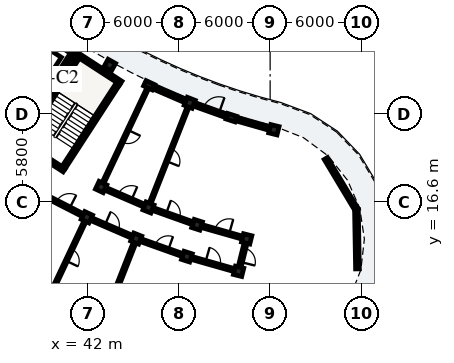
"""IFC4 building model, lengths in metres.
Left out: names, types, materials, properties, quantities, classifications, styles, units other than length and angle.
Written with IfcOpenShell. Run it as: python <this file> out.ifc"""

import sys

from ifc_helpers import new_model, si_unit, direction, frame, frame_2d, origin, origin_2d, place, context, subcontext, project, spatial, rectangle, extrude, element, fill, save


model = new_model("IFC4")
c1 = context("Model", 3, precision=1e-05, world=origin(), true_north=direction((0.0, 1.0)))
c2 = subcontext(c1, "Body", "Model", "MODEL_VIEW")
j1 = project(units=[si_unit("LENGTHUNIT", "METRE"), si_unit("PLANEANGLEUNIT", "RADIAN")], contexts=[c1])
p1 = place(None, origin())
s1 = spatial("IfcSite", under=j1, at=p1, CompositionType="ELEMENT")
p2 = place(p1, origin())
s2 = spatial("IfcBuilding", under=s1, at=p2, CompositionType="ELEMENT")
p3 = place(p2, frame((0.0, 0.0, 12.2)))
s3 = spatial("IfcBuildingStorey", under=s2, at=p3, CompositionType="ELEMENT", Elevation=12.2)
p4 = place(p3, frame((40.413, 18.882, 0.0), z_axis=(0.0, 0.0, 1.0), x_axis=(0.544629435258, 0.838676802022, 0.0)))
e1 = element("IfcWall", 1, at=p4, inside=s3, PredefinedType="SHEAR", context=c2, shape_type="SweptSolid", body=[
    extrude(rectangle(XDim=6.6, YDim=0.25, at=frame_2d((3.3, 0.0))), origin(), (0.0, 0.0, 1.0), 3.11),
])
p5 = place(p3, frame((44.18, 24.454, 0.0), z_axis=(0.0, 0.0, 1.0), x_axis=(-0.838699580527, 0.544594356953, 0.0)))
e2 = element("IfcWall", 2, at=p5, inside=s3, PredefinedType="SHEAR", context=c2, shape_type="SweptSolid", body=[
    extrude(rectangle(XDim=3.42, YDim=0.25, at=frame_2d((1.71, 0.0))), origin(), (0.0, 0.0, 1.0), 3.11),
])
p6 = place(p3, frame((40.449, 18.709, 0.0), z_axis=(0.0, 0.0, 1.0), x_axis=(-0.838678407117, 0.544626963559, 0.0)))
e3 = element("IfcWall", 3, at=p6, inside=s3, PredefinedType="SHEAR", context=c2, shape_type="SweptSolid", body=[
    extrude(rectangle(XDim=3.42, YDim=0.25, at=frame_2d((1.71, 0.0))), origin(), (0.0, 0.0, 1.0), 3.11),
])
p7 = place(p3, frame((37.754, 20.608, 0.0), z_axis=(0.0, 0.0, 1.0), x_axis=(0.544655453679, 0.838659905312, 0.0)))
e4 = element("IfcWall", 4, at=p7, inside=s3, PredefinedType="SHEAR", context=c2, shape_type="SweptSolid", body=[
    extrude(rectangle(XDim=6.6, YDim=0.25, at=frame_2d((3.3, 0.0))), origin(), (0.0, 0.0, 1.0), 3.11),
])
p8 = place(p7, frame((0.22, 0.0, 0.0)))
e5 = element("IfcOpeningElement", 5, at=p8, cuts=e4, PredefinedType="OPENING", context=c2, shape_type="SweptSolid", body=[
    extrude(rectangle(XDim=1.05, YDim=2.15, at=frame_2d((0.525, 1.075))), frame((0.0, 0.135, 0.0), z_axis=(0.0, -1.0, 0.0), x_axis=(1.0, 0.0, 0.0)), (0.0, 0.0, 1.0), 0.27),
])
p9 = place(p3, frame((41.112, 26.375, 0.0), z_axis=(0.0, 0.0, 1.0), x_axis=(-0.838638623546, 0.544688221919, 0.0)))
e6 = element("IfcWall", 6, at=p9, inside=s3, PredefinedType="SHEAR", context=c2, shape_type="SweptSolid", body=[
    extrude(rectangle(XDim=3.26, YDim=0.23, at=frame_2d((1.63, 0.0))), origin(), (0.0, 0.0, 1.0), 3.11),
])
p10 = place(p3, frame((39.482, 24.077, 0.0), z_axis=(0.0, 0.0, 1.0), x_axis=(0.544686387605, 0.838639814913, 0.0)))
e7 = element("IfcWall", 7, at=p10, inside=s3, PredefinedType="SHEAR", context=c2, shape_type="SweptSolid", body=[
    extrude(rectangle(XDim=2.7, YDim=0.23, at=frame_2d((1.35, 0.0))), origin(), (0.0, 0.0, 1.0), 3.11),
])
p11 = place(p3, frame((43.45, 25.623, 0.0), z_axis=(0.0, 0.0, 1.0), x_axis=(-0.484809620246, -0.874619707139, 0.0)))
e8 = element("IfcColumn", 8, at=p11, inside=s3, PredefinedType="COLUMN", context=c2, shape_type="SweptSolid", body=[
    extrude(rectangle(XDim=0.56, YDim=0.56, at=origin_2d()), origin(), (0.0, 0.0, 1.0), 3.105),
])
p12 = place(p3, frame((46.039, 24.297, 0.0), z_axis=(0.0, 0.0, 1.0), x_axis=(-0.426568739901, -0.904455145454, 0.0)))
e9 = element("IfcColumn", 9, at=p12, inside=s3, PredefinedType="PILASTER", context=c2, shape_type="SweptSolid", body=[
    extrude(rectangle(XDim=0.38, YDim=0.62, at=origin_2d()), origin(), (0.0, 0.0, 1.0), 3.105),
])
for number, where, z_axis, x_axis in (
    (10, (42.882, 17.604, 0.0), (0.0, 0.0, 1.0), (-0.427, -0.904, 0.0)),
    (11, (41.944, 15.614, 0.0), (0.0, 0.0, 1.0), (-0.427, -0.904, 0.0)),
    (12, (48.709, 23.143, 0.0), (0.0, 0.0, 1.0), (-0.367, -0.93, 0.0)),
    (13, (45.997, 16.258, 0.0), (0.0, 0.0, 1.0), (-0.367, -0.93, 0.0)),
    (14, (45.191, 14.211, 0.0), (0.0, 0.0, 1.0), (-0.367, -0.93, 0.0)),
):
    element("IfcColumn", number, at=place(p3, frame(where, z_axis=z_axis, x_axis=x_axis)), inside=s3, PredefinedType="COLUMN", context=c2, shape_type="SweptSolid", body=[
        extrude(rectangle(XDim=0.56, YDim=0.56, at=origin_2d()), origin(), (0.0, 0.0, 1.0), 3.105),
    ])
p13 = place(p3, frame((51.449, 22.166, 0.0), z_axis=(0.0, 0.0, 1.0), x_axis=(-0.304864299028, -0.952395799643, 0.0)))
e15 = element("IfcColumn", 15, at=p13, inside=s3, PredefinedType="PILASTER", context=c2, shape_type="SweptSolid", body=[
    extrude(rectangle(XDim=0.38, YDim=0.62, at=origin_2d()), origin(), (0.0, 0.0, 1.0), 3.105),
])
for number, where, z_axis, x_axis in (
    (16, (49.193, 15.118, 0.0), (0.0, 0.0, 1.0), (-0.305, -0.952, 0.0)),
    (17, (48.522, 13.023, 0.0), (0.0, 0.0, 1.0), (-0.305, -0.952, 0.0)),
    (18, (54.247, 21.37, 0.0), (0.0, 0.0, 1.0), (-0.242, -0.97, 0.0)),
    (19, (52.456, 14.19, 0.0), (0.0, 0.0, 1.0), (-0.242, -0.97, 0.0)),
    (20, (51.924, 12.055, 0.0), (0.0, 0.0, 1.0), (-0.242, -0.97, 0.0)),
):
    element("IfcColumn", number, at=place(p3, frame(where, z_axis=z_axis, x_axis=x_axis)), inside=s3, PredefinedType="COLUMN", context=c2, shape_type="SweptSolid", body=[
        extrude(rectangle(XDim=0.56, YDim=0.56, at=origin_2d()), origin(), (0.0, 0.0, 1.0), 3.105),
    ])
p14 = place(p3, frame((46.186, 24.233, 0.0), z_axis=(0.0, 0.0, 1.0), x_axis=(0.91795321239, -0.396688668686, 0.0)))
e21 = element("IfcWall", 21, at=p14, inside=s3, PredefinedType="SOLIDWALL", context=c2, shape_type="SweptSolid", body=[
    extrude(rectangle(XDim=2.499, YDim=0.245, at=frame_2d((1.25, 0.0))), origin(), (0.0, 0.0, 1.0), 2.355),
])
p15 = place(p14, frame((0.609, 0.0, 0.55)))
e22 = element("IfcOpeningElement", 22, at=p15, cuts=e21, PredefinedType="OPENING", context=c2, shape_type="SweptSolid", body=[
    extrude(rectangle(XDim=1.28, YDim=1.56, at=frame_2d((0.64, 0.78))), frame((0.0, 0.133, 0.0), z_axis=(0.0, -1.0, 0.0), x_axis=(1.0, 0.0, 0.0)), (0.0, 0.0, 1.0), 0.265),
])
p16 = place(p3, frame((48.945, 23.059, 0.0), z_axis=(0.0, 0.0, 1.0), x_axis=(0.941892135469, -0.33591547321, 0.0)))
e23 = element("IfcWall", 23, at=p16, inside=s3, PredefinedType="SOLIDWALL", context=c2, shape_type="SweptSolid", body=[
    extrude(rectangle(XDim=2.499, YDim=0.245, at=frame_2d((1.25, 0.0))), origin(), (0.0, 0.0, 1.0), 2.355),
])
p17 = place(p16, frame((0.709, 0.0, 0.0)))
e24 = element("IfcOpeningElement", 24, at=p17, cuts=e23, PredefinedType="OPENING", context=c2, shape_type="SweptSolid", body=[
    extrude(rectangle(XDim=1.08, YDim=2.15, at=frame_2d((0.54, 1.075))), frame((0.0, 0.133, 0.0), z_axis=(0.0, -1.0, 0.0), x_axis=(1.0, 0.0, 0.0)), (0.0, 0.0, 1.0), 0.265),
])
p18 = place(p3, frame((51.603, 22.122, 0.0), z_axis=(0.0, 0.0, 1.0), x_axis=(0.961847744742, -0.273585299195, 0.0)))
e25 = element("IfcWall", 25, at=p18, inside=s3, PredefinedType="SOLIDWALL", context=c2, shape_type="SweptSolid", body=[
    extrude(rectangle(XDim=2.499, YDim=0.245, at=frame_2d((1.249, 0.0))), origin(), (0.0, 0.0, 1.0), 2.355),
])
p19 = place(p18, frame((0.49, 0.0, 0.55)))
e26 = element("IfcOpeningElement", 26, at=p19, cuts=e25, PredefinedType="OPENING", context=c2, shape_type="SweptSolid", body=[
    extrude(rectangle(XDim=1.52, YDim=1.485, at=frame_2d((0.76, 0.743))), frame((0.0, 0.133, 0.0), z_axis=(0.0, -1.0, 0.0), x_axis=(1.0, 0.0, 0.0)), (0.0, 0.0, 1.0), 0.265),
])
p20 = place(p3, frame((57.665, 19.476, 0.0), z_axis=(0.0, 0.0, 1.0), x_axis=(0.515019321998, -0.857178568309, 0.0)))
e27 = element("IfcWall", 27, at=p20, inside=s3, PredefinedType="SOLIDWALL", context=c2, shape_type="SweptSolid", body=[
    extrude(rectangle(XDim=3.908, YDim=0.245, at=frame_2d((1.954, 0.0))), origin(), (0.0, 0.0, 1.0), 2.355),
])
p21 = place(p20, frame((1.029, 0.0, 0.4)))
e28 = element("IfcOpeningElement", 28, at=p21, cuts=e27, PredefinedType="OPENING", context=c2, shape_type="SweptSolid", body=[
    extrude(rectangle(XDim=1.85, YDim=1.72, at=frame_2d((0.925, 0.86))), frame((0.0, 0.133, 0.0), z_axis=(0.0, -1.0, 0.0), x_axis=(1.0, 0.0, 0.0)), (0.0, 0.0, 1.0), 0.265),
])
p22 = place(p3, frame((59.677, 16.126, 0.0), z_axis=(0.0, 0.0, 1.0), x_axis=(0.017490763899, -0.999847024888, 0.0)))
e29 = element("IfcWall", 29, at=p22, inside=s3, PredefinedType="SOLIDWALL", context=c2, shape_type="SweptSolid", body=[
    extrude(rectangle(XDim=3.908, YDim=0.245, at=frame_2d((1.954, 0.0))), origin(), (0.0, 0.0, 1.0), 2.355),
])
p23 = place(p22, frame((0.979, 0.0, 0.4)))
e30 = element("IfcOpeningElement", 30, at=p23, cuts=e29, PredefinedType="OPENING", context=c2, shape_type="SweptSolid", body=[
    extrude(rectangle(XDim=1.95, YDim=1.78, at=frame_2d((0.975, 0.89))), frame((0.0, 0.133, 0.0), z_axis=(0.0, -1.0, 0.0), x_axis=(1.0, 0.0, 0.0)), (0.0, 0.0, 1.0), 0.265),
])
p24 = place(p3, frame((39.107, 17.067, 0.0), z_axis=(0.0, 0.0, 1.0), x_axis=(0.890030590607, -0.45590080915, 0.0)))
e31 = element("IfcWall", 31, at=p24, inside=s3, PredefinedType="PARTITIONING", context=c2, shape_type="SweptSolid", body=[
    extrude(rectangle(XDim=2.837, YDim=0.195, at=frame_2d((1.418, 0.0))), origin(), (0.0, 0.0, 1.0), 2.37),
])
p25 = place(p24, frame((0.934, 0.0, 0.0)))
e32 = element("IfcOpeningElement", 32, at=p25, cuts=e31, PredefinedType="OPENING", context=c2, shape_type="SweptSolid", body=[
    extrude(rectangle(XDim=0.97, YDim=2.15, at=frame_2d((0.485, 1.075))), frame((0.0, 0.107, 0.0), z_axis=(0.0, -1.0, 0.0), x_axis=(1.0, 0.0, 0.0)), (0.0, 0.0, 1.0), 0.215),
])
p26 = place(p3, frame((41.773, 15.252, 0.0), z_axis=(0.0, 0.0, 1.0), x_axis=(-0.426567365945, -0.904455793453, 0.0)))
e33 = element("IfcWall", 33, at=p26, inside=s3, PredefinedType="PLUMBINGWALL", context=c2, shape_type="SweptSolid", body=[
    extrude(rectangle(XDim=4.7, YDim=0.14, at=frame_2d((2.35, 0.0))), origin(), (0.0, 0.0, 1.0), 2.37),
])
p27 = place(p26, frame((1.925, 0.0, 0.0)))
e34 = element("IfcOpeningElement", 34, at=p27, cuts=e33, PredefinedType="OPENING", context=c2, shape_type="SweptSolid", body=[
    extrude(rectangle(XDim=0.85, YDim=2.05, at=frame_2d((0.425, 1.025))), frame((0.0, 0.08, 0.0), z_axis=(0.0, -1.0, 0.0), x_axis=(1.0, 0.0, 0.0)), (0.0, 0.0, 1.0), 0.16),
])
p28 = place(p3, frame((45.868, 23.935, 0.0), z_axis=(0.0, 0.0, 1.0), x_axis=(-0.426573573579, -0.904452865728, 0.0)))
e35 = element("IfcWall", 35, at=p28, inside=s3, PredefinedType="PARTITIONING", context=c2, shape_type="SweptSolid", body=[
    extrude(rectangle(XDim=6.6, YDim=0.125, at=frame_2d((3.3, 0.0))), origin(), (0.0, 0.0, 1.0), 2.37),
])
p29 = place(p28, frame((2.855, 0.0, 0.0)))
e36 = element("IfcOpeningElement", 36, at=p29, cuts=e35, PredefinedType="OPENING", context=c2, shape_type="SweptSolid", body=[
    extrude(rectangle(XDim=0.89, YDim=2.1, at=frame_2d((0.445, 1.05))), frame((0.0, 0.073, 0.0), z_axis=(0.0, -1.0, 0.0), x_axis=(1.0, 0.0, 0.0)), (0.0, 0.0, 1.0), 0.145),
])
p30 = place(p3, frame((42.265, 15.475, 0.0), z_axis=(0.0, 0.0, 1.0), x_axis=(0.917943439406, -0.396711282991, 0.0)))
e37 = element("IfcWall", 37, at=p30, inside=s3, PredefinedType="PARTITIONING", context=c2, shape_type="SweptSolid", body=[
    extrude(rectangle(XDim=2.837, YDim=0.195, at=frame_2d((1.418, 0.0))), origin(), (0.0, 0.0, 1.0), 2.37),
])
p31 = place(p30, frame((0.944, 0.0, 0.0)))
e38 = element("IfcOpeningElement", 38, at=p31, cuts=e37, PredefinedType="OPENING", context=c2, shape_type="SweptSolid", body=[
    extrude(rectangle(XDim=0.95, YDim=2.13, at=frame_2d((0.475, 1.065))), frame((0.0, 0.107, 0.0), z_axis=(0.0, -1.0, 0.0), x_axis=(1.0, 0.0, 0.0)), (0.0, 0.0, 1.0), 0.215),
])
p32 = place(p3, frame((43.204, 17.465, 0.0), z_axis=(0.0, 0.0, 1.0), x_axis=(0.91793557165, -0.39672948756, 0.0)))
e39 = element("IfcWall", 39, at=p32, inside=s3, PredefinedType="PARTITIONING", context=c2, shape_type="SweptSolid", body=[
    extrude(rectangle(XDim=2.693, YDim=0.195, at=frame_2d((1.346, 0.0))), origin(), (0.0, 0.0, 1.0), 2.37),
])
p33 = place(p32, frame((0.872, 0.0, 0.0)))
e40 = element("IfcOpeningElement", 40, at=p33, cuts=e39, PredefinedType="OPENING", context=c2, shape_type="SweptSolid", body=[
    extrude(rectangle(XDim=0.95, YDim=2.13, at=frame_2d((0.475, 1.065))), frame((0.0, 0.107, 0.0), z_axis=(0.0, -1.0, 0.0), x_axis=(1.0, 0.0, 0.0)), (0.0, 0.0, 1.0), 0.215),
])
p34 = place(p3, frame((45.044, 13.839, 0.0), z_axis=(0.0, 0.0, 1.0), x_axis=(-0.366468650514, -0.930430399434, 0.0)))
e41 = element("IfcWall", 41, at=p34, inside=s3, PredefinedType="PARTITIONING", context=c2, shape_type="SweptSolid", body=[
    extrude(rectangle(XDim=4.7, YDim=0.175, at=frame_2d((2.35, 0.0))), origin(), (0.0, 0.0, 1.0), 2.37),
])
p35 = place(p3, frame((48.562, 22.771, 0.0), z_axis=(0.0, 0.0, 1.0), x_axis=(-0.366512873936, -0.930412979939, 0.0)))
e42 = element("IfcWall", 42, at=p35, inside=s3, PredefinedType="PARTITIONING", context=c2, shape_type="SweptSolid", body=[
    extrude(rectangle(XDim=6.6, YDim=0.125, at=frame_2d((3.3, 0.0))), origin(), (0.0, 0.0, 1.0), 2.37),
])
p36 = place(p35, frame((2.865, 0.0, 0.0)))
e43 = element("IfcOpeningElement", 43, at=p36, cuts=e42, PredefinedType="OPENING", context=c2, shape_type="SweptSolid", body=[
    extrude(rectangle(XDim=0.87, YDim=2.08, at=frame_2d((0.435, 1.04))), frame((0.0, 0.073, 0.0), z_axis=(0.0, -1.0, 0.0), x_axis=(1.0, 0.0, 0.0)), (0.0, 0.0, 1.0), 0.145),
])
p37 = place(p3, frame((45.52, 14.093, 0.0), z_axis=(0.0, 0.0, 1.0), x_axis=(0.941930628611, -0.335807520589, 0.0)))
e44 = element("IfcWall", 44, at=p37, inside=s3, PredefinedType="PARTITIONING", context=c2, shape_type="SweptSolid", body=[
    extrude(rectangle(XDim=2.837, YDim=0.195, at=frame_2d((1.418, 0.0))), origin(), (0.0, 0.0, 1.0), 2.37),
])
p38 = place(p37, frame((0.954, 0.0, 0.0)))
e45 = element("IfcOpeningElement", 45, at=p38, cuts=e44, PredefinedType="OPENING", context=c2, shape_type="SweptSolid", body=[
    extrude(rectangle(XDim=0.93, YDim=2.12, at=frame_2d((0.465, 1.06))), frame((0.0, 0.107, 0.0), z_axis=(0.0, -1.0, 0.0), x_axis=(1.0, 0.0, 0.0)), (0.0, 0.0, 1.0), 0.215),
])
p39 = place(p3, frame((46.327, 16.14, 0.0), z_axis=(0.0, 0.0, 1.0), x_axis=(0.941895652647, -0.335905611036, 0.0)))
e46 = element("IfcWall", 46, at=p39, inside=s3, PredefinedType="PARTITIONING", context=c2, shape_type="SweptSolid", body=[
    extrude(rectangle(XDim=2.693, YDim=0.195, at=frame_2d((1.346, 0.0))), origin(), (0.0, 0.0, 1.0), 2.37),
])
p40 = place(p39, frame((0.882, 0.0, 0.0)))
e47 = element("IfcOpeningElement", 47, at=p40, cuts=e46, PredefinedType="OPENING", context=c2, shape_type="SweptSolid", body=[
    extrude(rectangle(XDim=0.93, YDim=2.12, at=frame_2d((0.465, 1.06))), frame((0.0, 0.107, 0.0), z_axis=(0.0, -1.0, 0.0), x_axis=(1.0, 0.0, 0.0)), (0.0, 0.0, 1.0), 0.215),
])
p41 = place(p3, frame((48.859, 12.927, 0.0), z_axis=(0.0, 0.0, 1.0), x_axis=(0.961873892319, -0.273493355085, 0.0)))
e48 = element("IfcWall", 48, at=p41, inside=s3, PredefinedType="PARTITIONING", context=c2, shape_type="SweptSolid", body=[
    extrude(rectangle(XDim=2.837, YDim=0.195, at=frame_2d((1.418, 0.0))), origin(), (0.0, 0.0, 1.0), 2.37),
])
p42 = place(p41, frame((0.924, 0.0, 0.0)))
e49 = element("IfcOpeningElement", 49, at=p42, cuts=e48, PredefinedType="OPENING", context=c2, shape_type="SweptSolid", body=[
    extrude(rectangle(XDim=0.99, YDim=2.16, at=frame_2d((0.495, 1.08))), frame((0.0, 0.107, 0.0), z_axis=(0.0, -1.0, 0.0), x_axis=(1.0, 0.0, 0.0)), (0.0, 0.0, 1.0), 0.215),
])
p43 = place(p3, frame((49.53, 15.022, 0.0), z_axis=(0.0, 0.0, 1.0), x_axis=(0.961861926514, -0.273535435224, 0.0)))
e50 = element("IfcWall", 50, at=p43, inside=s3, PredefinedType="PARTITIONING", context=c2, shape_type="SweptSolid", body=[
    extrude(rectangle(XDim=2.693, YDim=0.195, at=frame_2d((1.346, 0.0))), origin(), (0.0, 0.0, 1.0), 2.37),
])
p44 = place(p43, frame((0.852, 0.0, 0.0)))
e51 = element("IfcOpeningElement", 51, at=p44, cuts=e50, PredefinedType="OPENING", context=c2, shape_type="SweptSolid", body=[
    extrude(rectangle(XDim=0.99, YDim=2.16, at=frame_2d((0.495, 1.08))), frame((0.0, 0.107, 0.0), z_axis=(0.0, -1.0, 0.0), x_axis=(1.0, 0.0, 0.0)), (0.0, 0.0, 1.0), 0.215),
])
p45 = place(p3, frame((52.444, 14.142, 0.0), z_axis=(0.0, 0.0, 1.0), x_axis=(-0.241933770084, -0.970292765557, 0.0)))
e52 = element("IfcWall", 52, at=p45, inside=s3, PredefinedType="PARTITIONING", context=c2, shape_type="SweptSolid", body=[
    extrude(rectangle(XDim=2.1, YDim=0.195, at=frame_2d((1.05, 0.0))), origin(), (0.0, 0.0, 1.0), 2.37),
])
p46 = place(p45, frame((0.57, 0.0, 0.0)))
e53 = element("IfcOpeningElement", 53, at=p46, cuts=e52, PredefinedType="OPENING", context=c2, shape_type="SweptSolid", body=[
    extrude(rectangle(XDim=0.95, YDim=2.13, at=frame_2d((0.475, 1.065))), frame((0.0, 0.107, 0.0), z_axis=(0.0, -1.0, 0.0), x_axis=(1.0, 0.0, 0.0)), (0.0, 0.0, 1.0), 0.215),
])
p47 = place(p15, origin())
e54 = element("IfcWindow", 54, at=p47, inside=s3, PartitioningType="SINGLE_PANEL", PredefinedType="WINDOW", context=c2, shape_type="SweptSolid", body=[
    extrude(rectangle(XDim=1.28, YDim=1.56, at=frame_2d((0.64, 0.78))), frame((0.0, 0.03, 0.0), z_axis=(0.0, -1.0, 0.0), x_axis=(1.0, 0.0, 0.0)), (0.0, 0.0, 1.0), 0.06),
])
fill(e22, e54)
p48 = place(p17, origin())
e55 = element("IfcDoor", 55, at=p48, inside=s3, OperationType="SINGLE_SWING_RIGHT", PredefinedType="DOOR", context=c2, shape_type="SweptSolid", body=[
    extrude(rectangle(XDim=1.08, YDim=2.15, at=frame_2d((0.54, 1.075))), frame((0.0, 0.025, 0.0), z_axis=(0.0, -1.0, 0.0), x_axis=(1.0, 0.0, 0.0)), (0.0, 0.0, 1.0), 0.05),
])
fill(e24, e55)
p49 = place(p19, origin())
e56 = element("IfcWindow", 56, at=p49, inside=s3, PartitioningType="SINGLE_PANEL", PredefinedType="WINDOW", context=c2, shape_type="SweptSolid", body=[
    extrude(rectangle(XDim=1.52, YDim=1.485, at=frame_2d((0.76, 0.743))), frame((0.0, 0.03, 0.0), z_axis=(0.0, -1.0, 0.0), x_axis=(1.0, 0.0, 0.0)), (0.0, 0.0, 1.0), 0.06),
])
fill(e26, e56)
p50 = place(p21, origin())
e57 = element("IfcWindow", 57, at=p50, inside=s3, PartitioningType="SINGLE_PANEL", PredefinedType="WINDOW", context=c2, shape_type="SweptSolid", body=[
    extrude(rectangle(XDim=1.85, YDim=1.72, at=frame_2d((0.925, 0.86))), frame((0.0, 0.03, 0.0), z_axis=(0.0, -1.0, 0.0), x_axis=(1.0, 0.0, 0.0)), (0.0, 0.0, 1.0), 0.06),
])
fill(e28, e57)
p51 = place(p23, origin())
e58 = element("IfcWindow", 58, at=p51, inside=s3, PartitioningType="SINGLE_PANEL", PredefinedType="WINDOW", context=c2, shape_type="SweptSolid", body=[
    extrude(rectangle(XDim=1.95, YDim=1.78, at=frame_2d((0.975, 0.89))), frame((0.0, 0.03, 0.0), z_axis=(0.0, -1.0, 0.0), x_axis=(1.0, 0.0, 0.0)), (0.0, 0.0, 1.0), 0.06),
])
fill(e30, e58)
p52 = place(p25, origin())
e59 = element("IfcDoor", 59, at=p52, inside=s3, OperationType="SINGLE_SWING_RIGHT", PredefinedType="DOOR", context=c2, shape_type="SweptSolid", body=[
    extrude(rectangle(XDim=0.97, YDim=2.15, at=frame_2d((0.485, 1.075))), frame((0.0, 0.025, 0.0), z_axis=(0.0, -1.0, 0.0), x_axis=(1.0, 0.0, 0.0)), (0.0, 0.0, 1.0), 0.05),
])
fill(e32, e59)
p53 = place(p27, origin())
e60 = element("IfcDoor", 60, at=p53, inside=s3, OperationType="SINGLE_SWING_RIGHT", PredefinedType="DOOR", context=c2, shape_type="SweptSolid", body=[
    extrude(rectangle(XDim=0.85, YDim=2.05, at=frame_2d((0.425, 1.025))), frame((0.0, 0.025, 0.0), z_axis=(0.0, -1.0, 0.0), x_axis=(1.0, 0.0, 0.0)), (0.0, 0.0, 1.0), 0.05),
])
fill(e34, e60)
p54 = place(p29, origin())
e61 = element("IfcDoor", 61, at=p54, inside=s3, OperationType="SINGLE_SWING_LEFT", PredefinedType="DOOR", context=c2, shape_type="SweptSolid", body=[
    extrude(rectangle(XDim=0.89, YDim=2.1, at=frame_2d((0.445, 1.05))), frame((0.0, 0.025, 0.0), z_axis=(0.0, -1.0, 0.0), x_axis=(1.0, 0.0, 0.0)), (0.0, 0.0, 1.0), 0.05),
])
fill(e36, e61)
p55 = place(p31, origin())
e62 = element("IfcDoor", 62, at=p55, inside=s3, OperationType="SINGLE_SWING_LEFT", PredefinedType="DOOR", context=c2, shape_type="SweptSolid", body=[
    extrude(rectangle(XDim=0.95, YDim=2.13, at=frame_2d((0.475, 1.065))), frame((0.0, 0.025, 0.0), z_axis=(0.0, -1.0, 0.0), x_axis=(1.0, 0.0, 0.0)), (0.0, 0.0, 1.0), 0.05),
])
fill(e38, e62)
p56 = place(p33, origin())
e63 = element("IfcDoor", 63, at=p56, inside=s3, OperationType="SINGLE_SWING_RIGHT", PredefinedType="DOOR", context=c2, shape_type="SweptSolid", body=[
    extrude(rectangle(XDim=0.95, YDim=2.13, at=frame_2d((0.475, 1.065))), frame((0.0, 0.025, 0.0), z_axis=(0.0, -1.0, 0.0), x_axis=(1.0, 0.0, 0.0)), (0.0, 0.0, 1.0), 0.05),
])
fill(e40, e63)
p57 = place(p36, origin())
e64 = element("IfcDoor", 64, at=p57, inside=s3, OperationType="SINGLE_SWING_RIGHT", PredefinedType="DOOR", context=c2, shape_type="SweptSolid", body=[
    extrude(rectangle(XDim=0.87, YDim=2.08, at=frame_2d((0.435, 1.04))), frame((0.0, 0.025, 0.0), z_axis=(0.0, -1.0, 0.0), x_axis=(1.0, 0.0, 0.0)), (0.0, 0.0, 1.0), 0.05),
])
fill(e43, e64)
p58 = place(p38, origin())
e65 = element("IfcDoor", 65, at=p58, inside=s3, OperationType="SINGLE_SWING_RIGHT", PredefinedType="DOOR", context=c2, shape_type="SweptSolid", body=[
    extrude(rectangle(XDim=0.93, YDim=2.12, at=frame_2d((0.465, 1.06))), frame((0.0, 0.025, 0.0), z_axis=(0.0, -1.0, 0.0), x_axis=(1.0, 0.0, 0.0)), (0.0, 0.0, 1.0), 0.05),
])
fill(e45, e65)
p59 = place(p40, origin())
e66 = element("IfcDoor", 66, at=p59, inside=s3, OperationType="SINGLE_SWING_LEFT", PredefinedType="DOOR", context=c2, shape_type="SweptSolid", body=[
    extrude(rectangle(XDim=0.93, YDim=2.12, at=frame_2d((0.465, 1.06))), frame((0.0, 0.025, 0.0), z_axis=(0.0, -1.0, 0.0), x_axis=(1.0, 0.0, 0.0)), (0.0, 0.0, 1.0), 0.05),
])
fill(e47, e66)
p60 = place(p42, origin())
e67 = element("IfcDoor", 67, at=p60, inside=s3, OperationType="SINGLE_SWING_LEFT", PredefinedType="DOOR", context=c2, shape_type="SweptSolid", body=[
    extrude(rectangle(XDim=0.99, YDim=2.16, at=frame_2d((0.495, 1.08))), frame((0.0, 0.025, 0.0), z_axis=(0.0, -1.0, 0.0), x_axis=(1.0, 0.0, 0.0)), (0.0, 0.0, 1.0), 0.05),
])
fill(e49, e67)
p61 = place(p44, origin())
e68 = element("IfcDoor", 68, at=p61, inside=s3, OperationType="SINGLE_SWING_RIGHT", PredefinedType="DOOR", context=c2, shape_type="SweptSolid", body=[
    extrude(rectangle(XDim=0.99, YDim=2.16, at=frame_2d((0.495, 1.08))), frame((0.0, 0.025, 0.0), z_axis=(0.0, -1.0, 0.0), x_axis=(1.0, 0.0, 0.0)), (0.0, 0.0, 1.0), 0.05),
])
fill(e51, e68)
p62 = place(p46, origin())
e69 = element("IfcDoor", 69, at=p62, inside=s3, OperationType="SINGLE_SWING_RIGHT", PredefinedType="DOOR", context=c2, shape_type="SweptSolid", body=[
    extrude(rectangle(XDim=0.95, YDim=2.13, at=frame_2d((0.475, 1.065))), frame((0.0, 0.025, 0.0), z_axis=(0.0, -1.0, 0.0), x_axis=(1.0, 0.0, 0.0)), (0.0, 0.0, 1.0), 0.05),
])
fill(e53, e69)
save(model, sys.argv[1])
